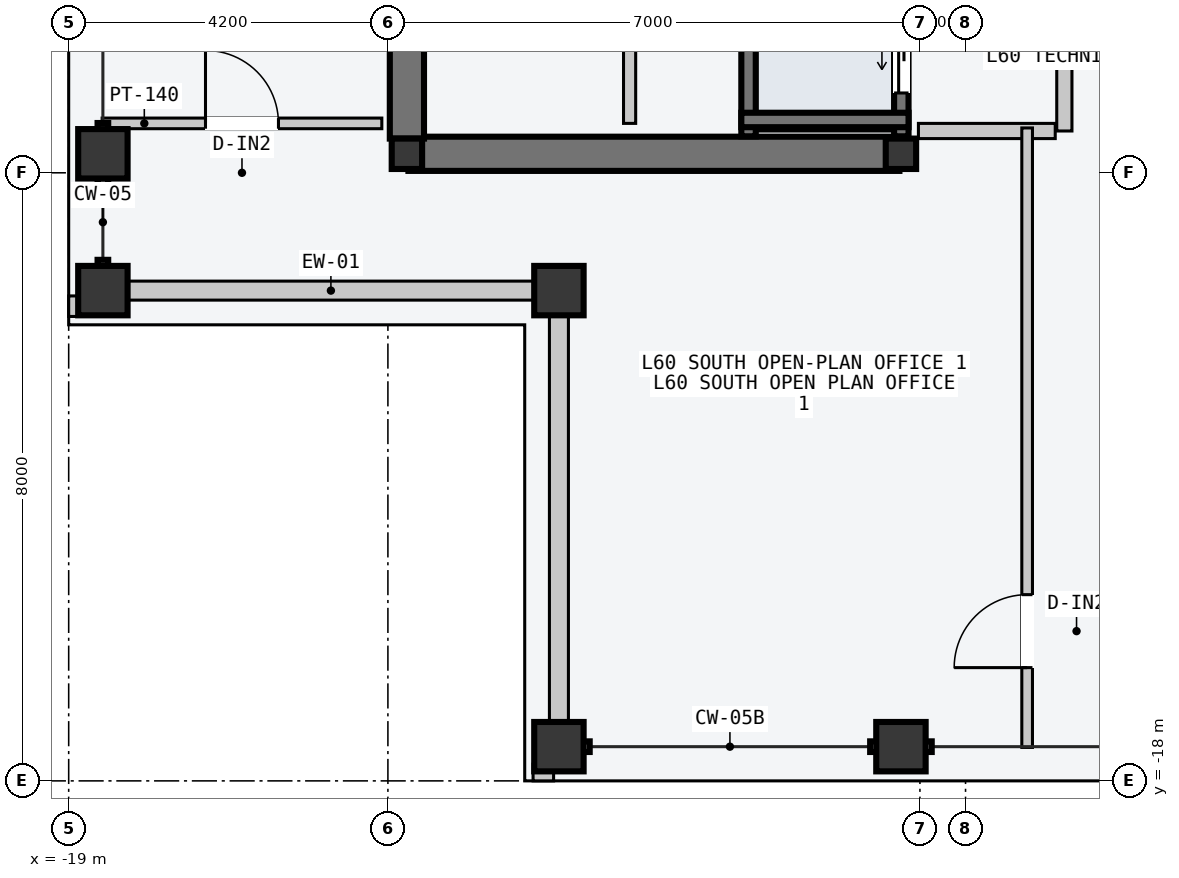
"""IFC4 building model, lengths in metres.
Left out: names, types, materials, properties, quantities, classifications, styles, units other than length and angle.
Written with IfcOpenShell. Run it as: python <this file> out.ifc"""

import sys

from ifc_helpers import new_model, si_unit, direction, frame, frame_2d, origin, origin_2d, place, context, subcontext, project, spatial, rectangle, hollow_rectangle, i_section, extrude, element, fill, save


model = new_model("IFC4")
c1 = context("Model", 3, precision=1e-05, world=origin(), true_north=direction((0.0, 1.0)))
c2 = subcontext(c1, "Body", "Model", "MODEL_VIEW")
j1 = project(units=[si_unit("LENGTHUNIT", "METRE"), si_unit("PLANEANGLEUNIT", "RADIAN")], contexts=[c1])
p1 = place(None, origin())
s1 = spatial("IfcSite", under=j1, at=p1, CompositionType="ELEMENT")
p2 = place(p1, origin())
s2 = spatial("IfcBuilding", under=s1, at=p2, CompositionType="ELEMENT")
p3 = place(p2, frame((0.0, 0.0, 229.2)))
s3 = spatial("IfcBuildingStorey", under=s2, at=p3, CompositionType="ELEMENT", Elevation=229.2)
p4 = place(p3, frame((-14.53, -9.75, -0.2), z_axis=(0.0, 0.0, 1.0), x_axis=(1.0, 0.0, 0.0)))
e1 = element("IfcWall", 1, at=p4, inside=s3, PredefinedType="SHEAR", context=c2, shape_type="SweptSolid", body=[
    extrude(rectangle(XDim=6.46, YDim=0.45, at=frame_2d((3.23, 0.0))), origin(), (0.0, 0.0, 1.0), 3.6),
])
p5 = place(p3, frame((-14.55, -9.55, -0.2), z_axis=(0.0, 0.0, 1.0), x_axis=(0.0, 1.0, 0.0)))
e2 = element("IfcWall", 2, at=p5, inside=s3, PredefinedType="SHEAR", context=c2, shape_type="SweptSolid", body=[
    extrude(rectangle(XDim=9.35, YDim=0.45, at=frame_2d((4.675, 0.0))), origin(), (0.0, 0.0, 1.0), 3.6),
])
for number, where, z_axis, x_axis in (
    (3, (-14.55, -9.75, 0.0), (0.0, 0.0, 1.0), (1.0, 0.0, 0.0)),
    (4, (-8.05, -9.75, 0.0), (0.0, 0.0, 1.0), (1.0, 0.0, 0.0)),
):
    element("IfcColumn", number, at=place(p3, frame(where, z_axis=z_axis, x_axis=x_axis)), inside=s3, PredefinedType="COLUMN", context=c2, shape_type="SweptSolid", body=[
        extrude(i_section(OverallWidth=0.4, OverallDepth=0.4, WebThickness=0.013, FlangeThickness=0.021, at=origin_2d()), origin(), (0.0, 0.0, 1.0), 3.6),
    ])
for number, where, z_axis, x_axis in (
    (5, (-12.55, -17.55, 0.0), (0.0, 0.0, 1.0), (1.0, 0.0, 0.0)),
    (6, (-8.05, -17.55, 0.0), (0.0, 0.0, 1.0), (1.0, 0.0, 0.0)),
    (7, (-18.55, -11.55, 0.0), (0.0, 0.0, 1.0), (0.0, 1.0, 0.0)),
    (8, (-18.55, -9.75, 0.0), (0.0, 0.0, 1.0), (0.0, 1.0, 0.0)),
    (9, (-12.55, -11.55, 0.0), (0.0, 0.0, 1.0), (1.0, 0.0, 0.0)),
):
    element("IfcColumn", number, at=place(p3, frame(where, z_axis=z_axis, x_axis=x_axis)), inside=s3, PredefinedType="COLUMN", context=c2, shape_type="SweptSolid", body=[
        extrude(hollow_rectangle(XDim=0.65, YDim=0.65, WallThickness=0.028, at=origin_2d()), origin(), (0.0, 0.0, 1.0), 3.6),
    ])
for number, where, z_axis, x_axis in (
    (10, (-18.215, -11.55, 0.0), (0.0, 0.0, 1.0), (1.0, 0.0, 0.0)),
    (11, (-12.55, -17.215, 0.0), (0.0, 0.0, 1.0), (0.0, 1.0, 0.0)),
):
    element("IfcWall", number, at=place(p3, frame(where, z_axis=z_axis, x_axis=x_axis)), inside=s3, PredefinedType="STANDARD", context=c2, shape_type="SweptSolid", body=[
        extrude(rectangle(XDim=5.33, YDim=0.25, at=frame_2d((2.665, 0.0))), origin(), (0.0, 0.0, 1.0), 2.85),
    ])
for number, where, z_axis, x_axis in (
    (12, (-12.89, -17.89, 0.0), (0.0, 0.0, 1.0), (1.0, 0.0, 0.0)),
    (13, (-18.89, -11.89, 0.0), (0.0, 0.0, 1.0), (0.0, 1.0, 0.0)),
):
    element("IfcWall", number, at=place(p3, frame(where, z_axis=z_axis, x_axis=x_axis)), inside=s3, PredefinedType="PARAPET", context=c2, shape_type="SweptSolid", body=[
        extrude(rectangle(XDim=0.27, YDim=0.22, at=frame_2d((0.135, 0.0))), origin(), (0.0, 0.0, 1.0), 1.2),
    ])
p6 = place(p3, frame((-8.045, -9.52, -0.2), z_axis=(0.0, 0.0, 1.0), x_axis=(0.0, 1.0, 0.0)))
e14 = element("IfcWall", 14, at=p6, inside=s3, PredefinedType="SOLIDWALL", context=c2, shape_type="SweptSolid", body=[
    extrude(rectangle(XDim=2.12, YDim=0.19, at=frame_2d((1.06, 0.0))), origin(), (0.0, 0.0, 1.0), 3.6),
])
p7 = place(p6, frame((0.57, 0.0, 0.2)))
e15 = element("IfcOpeningElement", 15, at=p7, cuts=e14, PredefinedType="OPENING", context=c2, shape_type="SweptSolid", body=[
    extrude(rectangle(XDim=1.1, YDim=2.2, at=frame_2d((0.55, 1.1))), frame((0.0, 0.105, 0.0), z_axis=(0.0, -1.0, 0.0), x_axis=(1.0, 0.0, 0.0)), (0.0, 0.0, 1.0), 0.21),
])
p8 = place(p3, frame((-10.055, -9.52, -0.2), z_axis=(0.0, 0.0, 1.0), x_axis=(0.0, 1.0, 0.0)))
e16 = element("IfcWall", 16, at=p8, inside=s3, PredefinedType="SOLIDWALL", context=c2, shape_type="SweptSolid", body=[
    extrude(rectangle(XDim=2.12, YDim=0.19, at=frame_2d((1.06, 0.0))), origin(), (0.0, 0.0, 1.0), 3.6),
])
p9 = place(p3, frame((-10.15, -9.305, -0.2), z_axis=(0.0, 0.0, 1.0), x_axis=(1.0, 0.0, 0.0)))
e17 = element("IfcWall", 17, at=p9, inside=s3, PredefinedType="SOLIDWALL", context=c2, shape_type="SweptSolid", body=[
    extrude(rectangle(XDim=2.2, YDim=0.19, at=frame_2d((1.1, 0.0))), origin(), (0.0, 0.0, 1.0), 3.6),
])
p10 = place(p3, frame((-5.9, -9.45, 0.0), z_axis=(0.0, 0.0, 1.0), x_axis=(0.0, 1.0, 0.0)))
e18 = element("IfcWall", 18, at=p10, inside=s3, PredefinedType="PARTITIONING", context=c2, shape_type="SweptSolid", body=[
    extrude(rectangle(XDim=10.5, YDim=0.2, at=frame_2d((5.25, 0.0))), origin(), (0.0, 0.0, 1.0), 3.4),
])
p11 = place(p10, frame((3.9, 0.0, 0.0)))
e19 = element("IfcOpeningElement", 19, at=p11, cuts=e18, PredefinedType="OPENING", context=c2, shape_type="SweptSolid", body=[
    extrude(rectangle(XDim=1.5, YDim=2.2, at=frame_2d((0.75, 1.1))), frame((0.0, 0.11, 0.0), z_axis=(0.0, -1.0, 0.0), x_axis=(1.0, 0.0, 0.0)), (0.0, 0.0, 1.0), 0.22),
])
p12 = place(p3, frame((-6.02, -9.45, 0.0), z_axis=(0.0, 0.0, 1.0), x_axis=(-1.0, 0.0, 0.0)))
e20 = element("IfcWall", 20, at=p12, inside=s3, PredefinedType="PARTITIONING", context=c2, shape_type="SweptSolid", body=[
    extrude(rectangle(XDim=1.8, YDim=0.2, at=frame_2d((0.9, 0.0))), origin(), (0.0, 0.0, 1.0), 3.4),
])
p13 = place(p3, frame((-11.62, -9.35, 0.0), z_axis=(0.0, 0.0, 1.0), x_axis=(0.0, 1.0, 0.0)))
e21 = element("IfcWall", 21, at=p13, inside=s3, PredefinedType="PARTITIONING", context=c2, shape_type="SweptSolid", body=[
    extrude(rectangle(XDim=3.85, YDim=0.16, at=frame_2d((1.925, 0.0))), origin(), (0.0, 0.0, 1.0), 3.4),
])
p14 = place(p13, frame((1.475, 0.0, 0.0)))
e22 = element("IfcOpeningElement", 22, at=p14, cuts=e21, PredefinedType="OPENING", context=c2, shape_type="SweptSolid", body=[
    extrude(rectangle(XDim=0.9, YDim=2.15, at=frame_2d((0.45, 1.075))), frame((0.0, 0.09, 0.0), z_axis=(0.0, -1.0, 0.0), x_axis=(1.0, 0.0, 0.0)), (0.0, 0.0, 1.0), 0.18),
])
p15 = place(p3, frame((-6.39, -17.56, 0.0), z_axis=(0.0, 0.0, 1.0), x_axis=(0.0, 1.0, 0.0)))
e23 = element("IfcWall", 23, at=p15, inside=s3, PredefinedType="PARTITIONING", context=c2, shape_type="SweptSolid", body=[
    extrude(rectangle(XDim=8.15, YDim=0.14, at=frame_2d((4.075, 0.0))), origin(), (0.0, 0.0, 1.0), 3.4),
])
p16 = place(p15, frame((1.05, 0.0, 0.0)))
e24 = element("IfcOpeningElement", 24, at=p16, cuts=e23, PredefinedType="OPENING", context=c2, shape_type="SweptSolid", body=[
    extrude(rectangle(XDim=0.96, YDim=2.18, at=frame_2d((0.48, 1.09))), frame((0.0, 0.08, 0.0), z_axis=(0.0, -1.0, 0.0), x_axis=(1.0, 0.0, 0.0)), (0.0, 0.0, 1.0), 0.16),
])
p17 = place(p3, frame((-18.56, -9.35, 0.0), z_axis=(0.0, 0.0, 1.0), x_axis=(1.0, 0.0, 0.0)))
e25 = element("IfcWall", 25, at=p17, inside=s3, PredefinedType="PARTITIONING", context=c2, shape_type="SweptSolid", body=[
    extrude(rectangle(XDim=3.68, YDim=0.14, at=frame_2d((1.84, 0.0))), origin(), (0.0, 0.0, 1.0), 3.4),
])
p18 = place(p17, frame((1.36, 0.0, 0.0)))
e26 = element("IfcOpeningElement", 26, at=p18, cuts=e25, PredefinedType="OPENING", context=c2, shape_type="SweptSolid", body=[
    extrude(rectangle(XDim=0.96, YDim=2.18, at=frame_2d((0.48, 1.09))), frame((0.0, 0.08, 0.0), z_axis=(0.0, -1.0, 0.0), x_axis=(1.0, 0.0, 0.0)), (0.0, 0.0, 1.0), 0.16),
])
p19 = place(p7, origin())
e27 = element("IfcDoor", 27, at=p19, inside=s3, OperationType="SLIDING_TO_LEFT", PredefinedType="DOOR", context=c2, shape_type="SweptSolid", body=[
    extrude(rectangle(XDim=1.1, YDim=2.2, at=frame_2d((0.55, 1.1))), frame((0.0, 0.025, 0.0), z_axis=(0.0, -1.0, 0.0), x_axis=(1.0, 0.0, 0.0)), (0.0, 0.0, 1.0), 0.05),
])
fill(e15, e27)
p20 = place(p16, origin())
e28 = element("IfcDoor", 28, at=p20, inside=s3, OperationType="SINGLE_SWING_LEFT", PredefinedType="DOOR", context=c2, shape_type="SweptSolid", body=[
    extrude(rectangle(XDim=0.96, YDim=2.18, at=frame_2d((0.48, 1.09))), frame((0.0, 0.025, 0.0), z_axis=(0.0, -1.0, 0.0), x_axis=(1.0, 0.0, 0.0)), (0.0, 0.0, 1.0), 0.05),
])
fill(e24, e28)
p21 = place(p18, origin())
e29 = element("IfcDoor", 29, at=p21, inside=s3, OperationType="SINGLE_SWING_LEFT", PredefinedType="DOOR", context=c2, shape_type="SweptSolid", body=[
    extrude(rectangle(XDim=0.96, YDim=2.18, at=frame_2d((0.48, 1.09))), frame((0.0, 0.025, 0.0), z_axis=(0.0, -1.0, 0.0), x_axis=(1.0, 0.0, 0.0)), (0.0, 0.0, 1.0), 0.05),
])
fill(e26, e29)
save(model, sys.argv[1])
